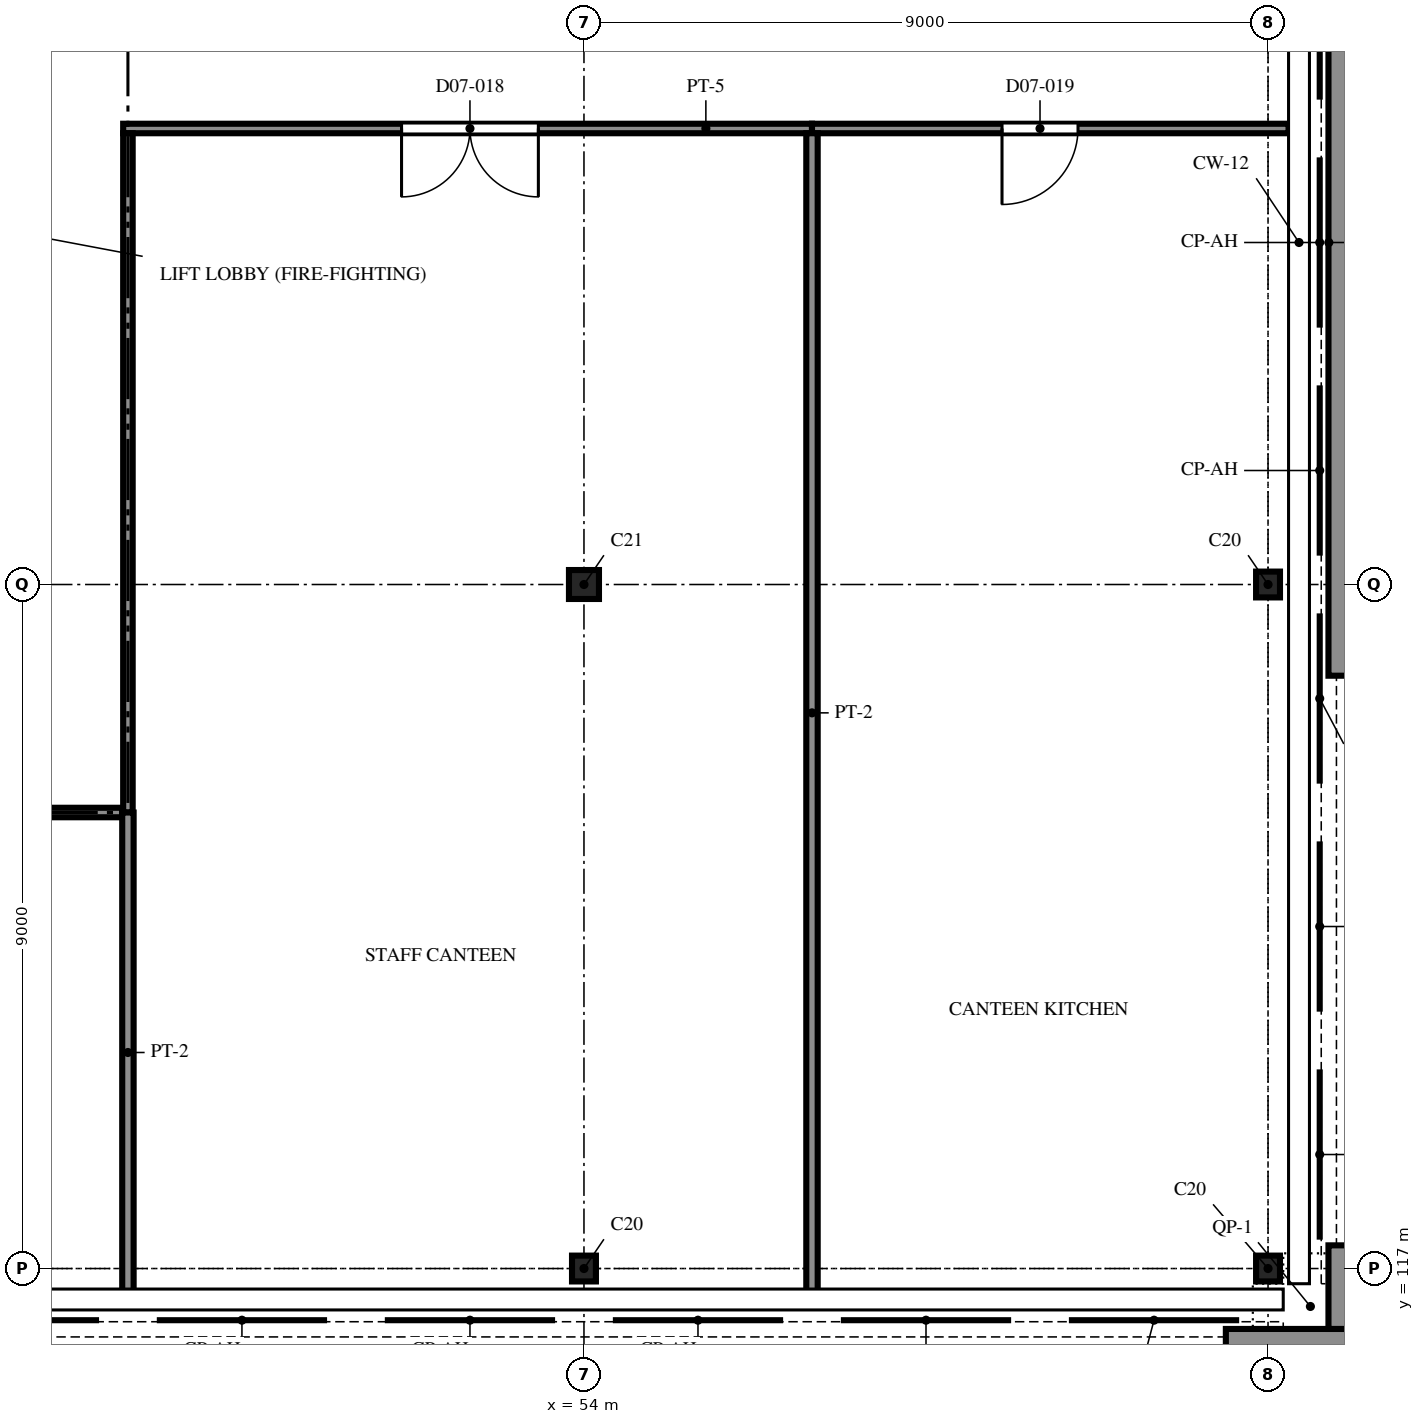
"""IFC4 building model, lengths in metres.
Left out: names, types, materials, properties, quantities, classifications, styles, units other than length and angle.
Written with IfcOpenShell. Run it as: python <this file> out.ifc"""

import sys

from ifc_helpers import new_model, si_unit, direction, frame, frame_2d, origin, origin_2d, place, context, subcontext, project, spatial, polyline, rectangle, i_section, outline, extrude, element, fill, save


model = new_model("IFC4")
c1 = context("Model", 3, precision=1e-05, world=origin(), true_north=direction((0.0, 1.0)))
c2 = subcontext(c1, "Body", "Model", "MODEL_VIEW")
j1 = project(units=[si_unit("LENGTHUNIT", "METRE"), si_unit("PLANEANGLEUNIT", "RADIAN")], contexts=[c1])
p1 = place(None, origin())
s1 = spatial("IfcSite", under=j1, at=p1, CompositionType="ELEMENT")
p2 = place(p1, origin())
s2 = spatial("IfcBuilding", under=s1, at=p2, CompositionType="ELEMENT")
p3 = place(p2, frame((0.0, 0.0, 32.7)))
s3 = spatial("IfcBuildingStorey", under=s2, at=p3, CompositionType="ELEMENT", Elevation=32.7)
p4 = place(p3, frame((54.0, 117.0, 0.0), z_axis=(0.0, 0.0, 1.0), x_axis=(1.0, 0.0, 0.0)))
e1 = element("IfcColumn", 1, at=p4, inside=s3, PredefinedType="COLUMN", context=c2, shape_type="SweptSolid", body=[
    extrude(i_section(OverallWidth=0.314, OverallDepth=0.34, WebThickness=0.019, FlangeThickness=0.031, FilletRadius=0.015, at=origin_2d()), origin(), (0.0, 0.0, 1.0), 4.2),
])
p5 = place(p3, frame((54.0, 126.0, 0.0), z_axis=(0.0, 0.0, 1.0), x_axis=(1.0, 0.0, 0.0)))
e2 = element("IfcColumn", 2, at=p5, inside=s3, PredefinedType="COLUMN", context=c2, shape_type="SweptSolid", body=[
    extrude(i_section(OverallWidth=0.395, OverallDepth=0.381, WebThickness=0.018, FlangeThickness=0.03, FilletRadius=0.015, at=origin_2d()), origin(), (0.0, 0.0, 1.0), 4.2),
])
for number, where, z_axis, x_axis in (
    (3, (63.0, 117.0, 0.0), (0.0, 0.0, 1.0), (1.0, 0.0, 0.0)),
    (4, (63.0, 126.0, 0.0), (0.0, 0.0, 1.0), (1.0, 0.0, 0.0)),
):
    element("IfcColumn", number, at=place(p3, frame(where, z_axis=z_axis, x_axis=x_axis)), inside=s3, PredefinedType="COLUMN", context=c2, shape_type="SweptSolid", body=[
        extrude(i_section(OverallWidth=0.314, OverallDepth=0.34, WebThickness=0.019, FlangeThickness=0.031, FilletRadius=0.015, at=origin_2d()), origin(), (0.0, 0.0, 1.0), 4.2),
    ])
p6 = place(p3, frame((64.62, 124.8, 0.0), z_axis=(0.0, 0.0, 1.0), x_axis=(0.0, 1.0, 0.0)))
e5 = element("IfcWall", 5, at=p6, inside=s3, PredefinedType="SOLIDWALL", context=c2, shape_type="SweptSolid", body=[
    extrude(outline(polyline([(11.4, 0.0), (11.4, 4.2), (0.0, 4.2), (0.0, 0.0), (11.4, 0.0)])), frame((0.0, 0.825, 0.0), z_axis=(0.0, -1.0, 0.0), x_axis=(1.0, 0.0, 0.0)), (0.0, 0.0, 1.0), 1.65),
])
p7 = place(p3, frame((62.445, 115.38, 0.0), z_axis=(0.0, 0.0, 1.0), x_axis=(1.0, 0.0, 0.0)))
e6 = element("IfcWall", 6, at=p7, inside=s3, PredefinedType="SOLIDWALL", context=c2, shape_type="SweptSolid", body=[
    extrude(rectangle(XDim=3.0, YDim=1.65, at=frame_2d((1.5, 0.0))), origin(), (0.0, 0.0, 1.0), 4.2),
])
p8 = place(p3, frame((64.62, 116.205, 0.0), z_axis=(0.0, 0.0, 1.0), x_axis=(0.0, 1.0, 0.0)))
e7 = element("IfcWall", 7, at=p8, inside=s3, PredefinedType="SOLIDWALL", context=c2, shape_type="SweptSolid", body=[
    extrude(rectangle(XDim=1.1, YDim=1.65, at=frame_2d((0.55, 0.0))), origin(), (0.0, 0.0, 1.0), 4.2),
])
p9 = place(p3, frame((47.925, 123.0, 0.0), z_axis=(0.0, 0.0, 1.0), x_axis=(-1.0, 0.0, 0.0)))
e8 = element("IfcWall", 8, at=p9, inside=s3, PredefinedType="PARTITIONING", context=c2, shape_type="SweptSolid", body=[
    extrude(rectangle(XDim=9.925, YDim=0.125, at=frame_2d((4.962, 0.0))), origin(), (0.0, 0.0, 1.0), 3.382),
])
p10 = place(p9, frame((4.025, 0.0, 0.0)))
e9 = element("IfcOpeningElement", 9, at=p10, cuts=e8, PredefinedType="OPENING", context=c2, shape_type="SweptSolid", body=[
    extrude(rectangle(XDim=1.8, YDim=2.4, at=frame_2d((0.9, 1.2))), frame((0.0, 0.073, 0.0), z_axis=(0.0, -1.0, 0.0), x_axis=(1.0, 0.0, 0.0)), (0.0, 0.0, 1.0), 0.145),
])
p11 = place(p3, frame((57.0, 132.0, 0.0), z_axis=(0.0, 0.0, 1.0), x_axis=(-1.0, 0.0, 0.0)))
e10 = element("IfcWall", 10, at=p11, inside=s3, PredefinedType="PARTITIONING", context=c2, shape_type="SweptSolid", body=[
    extrude(rectangle(XDim=9.062, YDim=0.125, at=frame_2d((4.531, 0.0))), origin(), (0.0, 0.0, 1.0), 3.382),
])
p12 = place(p11, frame((3.6, 0.0, 0.0)))
e11 = element("IfcOpeningElement", 11, at=p12, cuts=e10, PredefinedType="OPENING", context=c2, shape_type="SweptSolid", body=[
    extrude(rectangle(XDim=1.8, YDim=2.4, at=frame_2d((0.9, 1.2))), frame((0.0, 0.073, 0.0), z_axis=(0.0, -1.0, 0.0), x_axis=(1.0, 0.0, 0.0)), (0.0, 0.0, 1.0), 0.145),
])
p13 = place(p3, frame((48.0, 131.938, 0.0), z_axis=(0.0, 0.0, 1.0), x_axis=(0.0, -1.0, 0.0)))
e12 = element("IfcWall", 12, at=p13, inside=s3, PredefinedType="PARTITIONING", context=c2, shape_type="SweptSolid", body=[
    extrude(rectangle(XDim=8.938, YDim=0.125, at=frame_2d((4.469, 0.0))), origin(), (0.0, 0.0, 1.0), 3.382),
])
p14 = place(p3, frame((63.27, 132.0, 0.0), z_axis=(0.0, 0.0, 1.0), x_axis=(-1.0, 0.0, 0.0)))
e13 = element("IfcWall", 13, at=p14, inside=s3, PredefinedType="PARTITIONING", context=c2, shape_type="SweptSolid", body=[
    extrude(rectangle(XDim=6.27, YDim=0.125, at=frame_2d((3.135, 0.0))), origin(), (0.0, 0.0, 1.0), 3.382),
])
p15 = place(p14, frame((2.77, 0.0, 0.0)))
e14 = element("IfcOpeningElement", 14, at=p15, cuts=e13, PredefinedType="OPENING", context=c2, shape_type="SweptSolid", body=[
    extrude(rectangle(XDim=1.0, YDim=2.1, at=frame_2d((0.5, 1.05))), frame((0.0, 0.073, 0.0), z_axis=(0.0, -1.0, 0.0), x_axis=(1.0, 0.0, 0.0)), (0.0, 0.0, 1.0), 0.145),
])
p16 = place(p3, frame((48.0, 116.685, 0.0), z_axis=(0.0, 0.0, 1.0), x_axis=(0.0, 1.0, 0.0)))
e15 = element("IfcWall", 15, at=p16, inside=s3, PredefinedType="PARTITIONING", context=c2, shape_type="SweptSolid", body=[
    extrude(rectangle(XDim=6.315, YDim=0.15, at=frame_2d((3.157, 0.0))), origin(), (0.0, 0.0, 1.0), 3.382),
])
p17 = place(p3, frame((57.0, 131.938, 0.0), z_axis=(0.0, 0.0, 1.0), x_axis=(0.0, -1.0, 0.0)))
e16 = element("IfcWall", 16, at=p17, inside=s3, PredefinedType="PARTITIONING", context=c2, shape_type="SweptSolid", body=[
    extrude(rectangle(XDim=15.252, YDim=0.15, at=frame_2d((7.626, 0.0))), origin(), (0.0, 0.0, 1.0), 3.382),
])
p18 = place(p12, origin())
e17 = element("IfcDoor", 17, at=p18, inside=s3, OperationType="DOUBLE_DOOR_SINGLE_SWING", PredefinedType="DOOR", context=c2, shape_type="SweptSolid", body=[
    extrude(outline(polyline([(0.0, 0.0), (0.07, 0.0), (0.07, 2.33), (1.73, 2.33), (1.73, 0.0), (1.8, 0.0), (1.8, 2.4), (0.0, 2.4), (0.0, 0.0)])), frame((0.0, 0.025, 0.0), z_axis=(0.0, -1.0, 0.0), x_axis=(1.0, 0.0, 0.0)), (0.0, 0.0, 1.0), 0.05),
    extrude(outline(polyline([(0.074, 0.01), (0.897, 0.01), (0.897, 2.326), (0.074, 2.326), (0.074, 0.01)]), holes=[polyline([(0.194, 0.16), (0.777, 0.16), (0.777, 1.01), (0.194, 1.01), (0.194, 0.16)]), polyline([(0.335, 1.16), (0.635, 1.16), (0.635, 1.76), (0.335, 1.76), (0.335, 1.16)])]), frame((0.0, 0.017, 0.0), z_axis=(0.0, -1.0, 0.0), x_axis=(1.0, 0.0, 0.0)), (0.0, 0.0, 1.0), 0.035),
    extrude(rectangle(XDim=0.583, YDim=0.85, at=frame_2d((0.485, 0.585))), frame((0.0, 0.009, 0.0), z_axis=(0.0, -1.0, 0.0), x_axis=(1.0, 0.0, 0.0)), (0.0, 0.0, 1.0), 0.017),
    extrude(rectangle(XDim=0.3, YDim=0.6, at=frame_2d((0.485, 1.46))), frame((0.0, 0.006, 0.0), z_axis=(0.0, -1.0, 0.0), x_axis=(1.0, 0.0, 0.0)), (0.0, 0.0, 1.0), 0.012),
    extrude(outline(polyline([(0.903, 0.01), (1.726, 0.01), (1.726, 2.326), (0.903, 2.326), (0.903, 0.01)]), holes=[polyline([(1.023, 0.16), (1.606, 0.16), (1.606, 1.01), (1.023, 1.01), (1.023, 0.16)]), polyline([(1.165, 1.16), (1.465, 1.16), (1.465, 1.76), (1.165, 1.76), (1.165, 1.16)])]), frame((0.0, 0.017, 0.0), z_axis=(0.0, -1.0, 0.0), x_axis=(1.0, 0.0, 0.0)), (0.0, 0.0, 1.0), 0.035),
    extrude(rectangle(XDim=0.583, YDim=0.85, at=frame_2d((1.314, 0.585))), frame((0.0, 0.009, 0.0), z_axis=(0.0, -1.0, 0.0), x_axis=(1.0, 0.0, 0.0)), (0.0, 0.0, 1.0), 0.017),
    extrude(rectangle(XDim=0.3, YDim=0.6, at=frame_2d((1.314, 1.46))), frame((0.0, 0.006, 0.0), z_axis=(0.0, -1.0, 0.0), x_axis=(1.0, 0.0, 0.0)), (0.0, 0.0, 1.0), 0.012),
])
fill(e11, e17)
p19 = place(p15, origin())
e18 = element("IfcDoor", 18, at=p19, inside=s3, OperationType="SINGLE_SWING_RIGHT", PredefinedType="DOOR", context=c2, shape_type="SweptSolid", body=[
    extrude(outline(polyline([(0.0, 0.0), (0.07, 0.0), (0.07, 2.03), (0.93, 2.03), (0.93, 0.0), (1.0, 0.0), (1.0, 2.1), (0.0, 2.1), (0.0, 0.0)])), frame((0.0, 0.025, 0.0), z_axis=(0.0, -1.0, 0.0), x_axis=(1.0, 0.0, 0.0)), (0.0, 0.0, 1.0), 0.05),
    extrude(outline(polyline([(0.074, 0.01), (0.926, 0.01), (0.926, 2.026), (0.074, 2.026), (0.074, 0.01)]), holes=[polyline([(0.194, 0.16), (0.806, 0.16), (0.806, 1.01), (0.194, 1.01), (0.194, 0.16)]), polyline([(0.35, 1.16), (0.65, 1.16), (0.65, 1.76), (0.35, 1.76), (0.35, 1.16)])]), frame((0.0, 0.017, 0.0), z_axis=(0.0, -1.0, 0.0), x_axis=(1.0, 0.0, 0.0)), (0.0, 0.0, 1.0), 0.035),
    extrude(rectangle(XDim=0.612, YDim=0.85, at=frame_2d((0.5, 0.585))), frame((0.0, 0.009, 0.0), z_axis=(0.0, -1.0, 0.0), x_axis=(1.0, 0.0, 0.0)), (0.0, 0.0, 1.0), 0.017),
    extrude(rectangle(XDim=0.3, YDim=0.6, at=frame_2d((0.5, 1.46))), frame((0.0, 0.006, 0.0), z_axis=(0.0, -1.0, 0.0), x_axis=(1.0, 0.0, 0.0)), (0.0, 0.0, 1.0), 0.012),
])
fill(e14, e18)
save(model, sys.argv[1])
